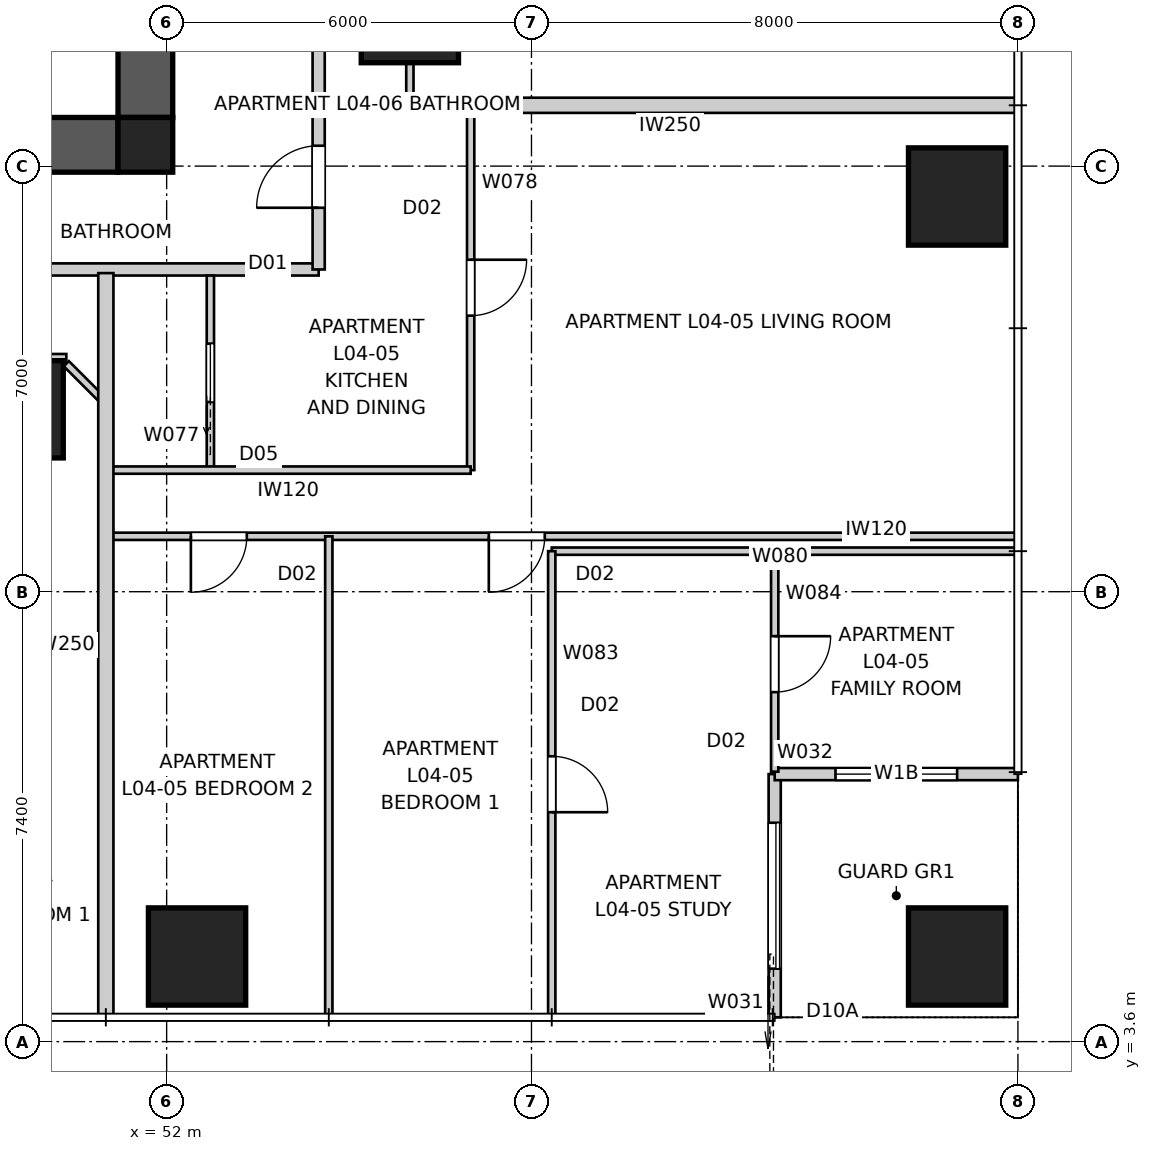
"""IFC4 building model, lengths in metres.
Left out: names, types, materials, properties, quantities, classifications, styles, units other than length and angle.
Written with IfcOpenShell. Run it as: python <this file> out.ifc"""

import sys

from ifc_helpers import new_model, si_unit, direction, frame, frame_2d, origin, origin_2d, place, context, subcontext, project, spatial, polyline, rectangle, outline, extrude, element, fill, save


model = new_model("IFC4")
c1 = context("Model", 3, precision=1e-05, world=origin(), true_north=direction((0.0, 1.0)))
c2 = subcontext(c1, "Body", "Model", "MODEL_VIEW")
j1 = project(units=[si_unit("LENGTHUNIT", "METRE"), si_unit("PLANEANGLEUNIT", "RADIAN")], contexts=[c1])
p1 = place(None, origin())
s1 = spatial("IfcSite", under=j1, at=p1, CompositionType="ELEMENT")
p2 = place(p1, origin())
s2 = spatial("IfcBuilding", under=s1, at=p2, CompositionType="ELEMENT")
p3 = place(p2, frame((0.0, 0.0, 18.4)))
s3 = spatial("IfcBuildingStorey", under=s2, at=p3, CompositionType="ELEMENT", Elevation=18.4)
p4 = place(p3, frame((51.2, 18.35, 0.0), z_axis=(0.0, 0.0, 1.0), x_axis=(-1.0, 0.0, 0.0)))
e1 = element("IfcWall", 1, at=p4, inside=s3, PredefinedType="SHEAR", context=c2, shape_type="SweptSolid", body=[
    extrude(outline(polyline([(0.0, -0.45), (22.4, -0.45), (22.4, -0.025), (22.85, -0.025), (22.85, 0.025), (22.4, 0.025), (22.4, 0.45), (0.0, 0.45), (0.0, 0.025), (-0.45, 0.025), (-0.45, -0.025), (0.0, -0.025), (0.0, -0.45)])), origin(), (0.0, 0.0, 1.0), 3.4),
])
p5 = place(p3, frame((51.65, 18.8, 0.0), z_axis=(0.0, 0.0, 1.0), x_axis=(0.0, 1.0, 0.0)))
e2 = element("IfcWall", 2, at=p5, inside=s3, PredefinedType="SHEAR", context=c2, shape_type="SweptSolid", body=[
    extrude(outline(polyline([(0.0, -0.45), (22.4, -0.45), (22.4, -0.025), (22.85, -0.025), (22.85, 0.025), (22.4, 0.025), (22.4, 0.45), (0.0, 0.45), (0.0, 0.025), (-0.45, 0.025), (-0.45, -0.025), (0.0, -0.025), (0.0, -0.45)])), origin(), (0.0, 0.0, 1.0), 3.4),
])
p6 = place(p5, frame((11.14, 0.0, 0.0)))
e3 = element("IfcOpeningElement", 3, at=p6, cuts=e2, PredefinedType="OPENING", context=c2, shape_type="SweptSolid", body=[
    extrude(rectangle(XDim=1.02, YDim=2.4, at=frame_2d((0.51, 1.2))), frame((0.0, 0.46, 0.0), z_axis=(0.0, -1.0, 0.0), x_axis=(1.0, 0.0, 0.0)), (0.0, 0.0, 1.0), 0.92),
])
p7 = place(p3, frame((51.65, 18.35, 0.0), z_axis=(0.0, 0.0, 1.0), x_axis=(1.0, 0.0, 0.0)))
e4 = element("IfcColumn", 4, at=p7, inside=s3, PredefinedType="COLUMN", context=c2, shape_type="SweptSolid", body=[
    extrude(rectangle(XDim=0.9, YDim=0.9, at=origin_2d()), origin(), (0.0, 0.0, 1.0), 3.4),
])
for number, where, z_axis, x_axis in (
    (5, (52.5, 5.0, 0.0), (0.0, 0.0, 1.0), (1.0, 0.0, 0.0)),
    (6, (65.0, 5.0, 0.0), (0.0, 0.0, 1.0), (1.0, 0.0, 0.0)),
    (7, (65.0, 17.5, 0.0), (0.0, 0.0, 1.0), (1.0, 0.0, 0.0)),
    (8, (49.5, 14.0, 0.0), (0.0, 0.0, 1.0), (1.0, 0.0, 0.0)),
    (9, (56.0, 20.5, 0.0), (0.0, 0.0, 1.0), (1.0, 0.0, 0.0)),
):
    element("IfcColumn", number, at=place(p3, frame(where, z_axis=z_axis, x_axis=x_axis)), inside=s3, PredefinedType="COLUMN", context=c2, shape_type="SweptSolid", body=[
        extrude(rectangle(XDim=1.6, YDim=1.6, at=origin_2d()), origin(), (0.0, 0.0, 1.0), 3.4),
    ])
p8 = place(p3, frame((62.0, 4.0, 0.0), z_axis=(0.0, 0.0, 1.0), x_axis=(0.0, 1.0, 0.0)))
e10 = element("IfcWall", 10, at=p8, inside=s3, PredefinedType="SOLIDWALL", context=c2, shape_type="SweptSolid", body=[
    extrude(rectangle(XDim=4.0, YDim=0.2, at=frame_2d((2.0, 0.0))), origin(), (0.0, 0.0, 1.0), 3.25),
])
p9 = place(p8, frame((0.8, 0.0, 0.0)))
e11 = element("IfcOpeningElement", 11, at=p9, cuts=e10, PredefinedType="OPENING", context=c2, shape_type="SweptSolid", body=[
    extrude(rectangle(XDim=2.4, YDim=2.1, at=frame_2d((1.2, 1.05))), frame((0.0, 0.11, 0.0), z_axis=(0.0, -1.0, 0.0), x_axis=(1.0, 0.0, 0.0)), (0.0, 0.0, 1.0), 0.22),
])
p10 = place(p3, frame((62.0, 8.0, 0.0), z_axis=(0.0, 0.0, 1.0), x_axis=(1.0, 0.0, 0.0)))
e12 = element("IfcWall", 12, at=p10, inside=s3, PredefinedType="SOLIDWALL", context=c2, shape_type="SweptSolid", body=[
    extrude(rectangle(XDim=4.0, YDim=0.2, at=frame_2d((2.0, 0.0))), origin(), (0.0, 0.0, 1.0), 3.25),
])
p11 = place(p10, frame((1.0, 0.0, 0.45)))
e13 = element("IfcOpeningElement", 13, at=p11, cuts=e12, PredefinedType="OPENING", context=c2, shape_type="SweptSolid", body=[
    extrude(rectangle(XDim=2.0, YDim=1.8, at=frame_2d((1.0, 0.9))), frame((0.0, 0.11, 0.0), z_axis=(0.0, -1.0, 0.0), x_axis=(1.0, 0.0, 0.0)), (0.0, 0.0, 1.0), 0.22),
])
p12 = place(p3, frame((25.5, 16.3, 0.0), z_axis=(0.0, 0.0, 1.0), x_axis=(1.0, 0.0, 0.0)))
e14 = element("IfcWall", 14, at=p12, inside=s3, PredefinedType="PARTITIONING", context=c2, shape_type="SweptSolid", body=[
    extrude(rectangle(XDim=29.0, YDim=0.2, at=frame_2d((14.5, 0.0))), origin(), (0.0, 0.0, 1.0), 3.25),
])
p13 = place(p12, frame((18.734, 0.0, 0.0)))
e15 = element("IfcOpeningElement", 15, at=p13, cuts=e14, PredefinedType="OPENING", context=c2, shape_type="SweptSolid", body=[
    extrude(rectangle(XDim=1.02, YDim=2.34, at=frame_2d((0.51, 1.17))), frame((0.0, 0.11, 0.0), z_axis=(0.0, -1.0, 0.0), x_axis=(1.0, 0.0, 0.0)), (0.0, 0.0, 1.0), 0.22),
])
p14 = place(p12, frame((5.096, 0.0, 0.0)))
e16 = element("IfcOpeningElement", 16, at=p14, cuts=e14, PredefinedType="OPENING", context=c2, shape_type="SweptSolid", body=[
    extrude(rectangle(XDim=1.02, YDim=2.34, at=frame_2d((0.51, 1.17))), frame((0.0, 0.11, 0.0), z_axis=(0.0, -1.0, 0.0), x_axis=(1.0, 0.0, 0.0)), (0.0, 0.0, 1.0), 0.22),
])
p15 = place(p3, frame((54.5, 16.3, 0.0), z_axis=(0.0, 0.0, 1.0), x_axis=(0.0, 1.0, 0.0)))
e17 = element("IfcWall", 17, at=p15, inside=s3, PredefinedType="PARTITIONING", context=c2, shape_type="SweptSolid", body=[
    extrude(rectangle(XDim=27.4, YDim=0.2, at=frame_2d((13.7, 0.0))), origin(), (0.0, 0.0, 1.0), 3.25),
])
p16 = place(p15, frame((20.998, 0.0, 0.0)))
e18 = element("IfcOpeningElement", 18, at=p16, cuts=e17, PredefinedType="OPENING", context=c2, shape_type="SweptSolid", body=[
    extrude(rectangle(XDim=1.02, YDim=2.34, at=frame_2d((0.51, 1.17))), frame((0.0, 0.11, 0.0), z_axis=(0.0, -1.0, 0.0), x_axis=(1.0, 0.0, 0.0)), (0.0, 0.0, 1.0), 0.22),
])
p17 = place(p15, frame((11.119, 0.0, 0.0)))
e19 = element("IfcOpeningElement", 19, at=p17, cuts=e17, PredefinedType="OPENING", context=c2, shape_type="SweptSolid", body=[
    extrude(rectangle(XDim=1.02, YDim=2.34, at=frame_2d((0.51, 1.17))), frame((0.0, 0.11, 0.0), z_axis=(0.0, -1.0, 0.0), x_axis=(1.0, 0.0, 0.0)), (0.0, 0.0, 1.0), 0.22),
])
p18 = place(p15, frame((1.015, 0.0, 0.0)))
e20 = element("IfcOpeningElement", 20, at=p18, cuts=e17, PredefinedType="OPENING", context=c2, shape_type="SweptSolid", body=[
    extrude(rectangle(XDim=1.02, YDim=2.34, at=frame_2d((0.51, 1.17))), frame((0.0, 0.11, 0.0), z_axis=(0.0, -1.0, 0.0), x_axis=(1.0, 0.0, 0.0)), (0.0, 0.0, 1.0), 0.22),
])
p19 = place(p3, frame((51.0, 4.0, 0.0), z_axis=(0.0, 0.0, 1.0), x_axis=(0.0, 1.0, 0.0)))
e21 = element("IfcWall", 21, at=p19, inside=s3, PredefinedType="PARTITIONING", context=c2, shape_type="SweptSolid", body=[
    extrude(rectangle(XDim=12.24, YDim=0.25, at=frame_2d((6.12, 0.0))), origin(), (0.0, 0.0, 1.0), 3.25),
])
p20 = place(p3, frame((66.0, 19.0, 0.0), z_axis=(0.0, 0.0, 1.0), x_axis=(-1.0, 0.0, 0.0)))
e22 = element("IfcWall", 22, at=p20, inside=s3, PredefinedType="PARTITIONING", context=c2, shape_type="SweptSolid", body=[
    extrude(rectangle(XDim=11.44, YDim=0.25, at=frame_2d((5.72, 0.0))), origin(), (0.0, 0.0, 1.0), 3.25),
])
p21 = place(p3, frame((51.0, 14.1, 0.0), z_axis=(0.0, 0.0, 1.0), x_axis=(-0.707106781187, 0.707106781187, 0.0)))
e23 = element("IfcWall", 23, at=p21, inside=s3, PredefinedType="PARTITIONING", context=c2, shape_type="SweptSolid", body=[
    extrude(rectangle(XDim=0.919, YDim=0.12, at=frame_2d((0.459, 0.0))), origin(), (0.0, 0.0, 1.0), 3.25),
])
p22 = place(p3, frame((50.35, 14.85, 0.0), z_axis=(0.0, 0.0, 1.0), x_axis=(-1.0, 0.0, 0.0)))
e24 = element("IfcWall", 24, at=p22, inside=s3, PredefinedType="PARTITIONING", context=c2, shape_type="SweptSolid", body=[
    extrude(rectangle(XDim=1.7, YDim=0.12, at=frame_2d((0.85, 0.0))), origin(), (0.0, 0.0, 1.0), 3.25),
])
p23 = place(p3, frame((52.719, 13.0, 0.0), z_axis=(0.0, 0.0, 1.0), x_axis=(0.0, 1.0, 0.0)))
e25 = element("IfcWall", 25, at=p23, inside=s3, PredefinedType="PARTITIONING", context=c2, shape_type="SweptSolid", body=[
    extrude(rectangle(XDim=3.2, YDim=0.12, at=frame_2d((1.6, 0.0))), origin(), (0.0, 0.0, 1.0), 3.25),
])
p24 = place(p23, frame((1.12, 0.0, 0.0)))
e26 = element("IfcOpeningElement", 26, at=p24, cuts=e25, PredefinedType="OPENING", context=c2, shape_type="SweptSolid", body=[
    extrude(rectangle(XDim=0.96, YDim=2.1, at=frame_2d((0.48, 1.05))), frame((0.0, 0.07, 0.0), z_axis=(0.0, -1.0, 0.0), x_axis=(1.0, 0.0, 0.0)), (0.0, 0.0, 1.0), 0.14),
])
p25 = place(p3, frame((57.0, 19.0, 0.0), z_axis=(0.0, 0.0, 1.0), x_axis=(0.0, -1.0, 0.0)))
e27 = element("IfcWall", 27, at=p25, inside=s3, PredefinedType="PARTITIONING", context=c2, shape_type="SweptSolid", body=[
    extrude(rectangle(XDim=6.0, YDim=0.12, at=frame_2d((3.0, 0.0))), origin(), (0.0, 0.0, 1.0), 3.25),
])
p26 = place(p25, frame((2.54, 0.0, 0.0)))
e28 = element("IfcOpeningElement", 28, at=p26, cuts=e27, PredefinedType="OPENING", context=c2, shape_type="SweptSolid", body=[
    extrude(rectangle(XDim=0.92, YDim=2.34, at=frame_2d((0.46, 1.17))), frame((0.0, 0.07, 0.0), z_axis=(0.0, -1.0, 0.0), x_axis=(1.0, 0.0, 0.0)), (0.0, 0.0, 1.0), 0.14),
])
p27 = place(p3, frame((57.0, 13.0, 0.0), z_axis=(0.0, 0.0, 1.0), x_axis=(-1.0, 0.0, 0.0)))
e29 = element("IfcWall", 29, at=p27, inside=s3, PredefinedType="PARTITIONING", context=c2, shape_type="SweptSolid", body=[
    extrude(rectangle(XDim=6.0, YDim=0.12, at=frame_2d((3.0, 0.0))), origin(), (0.0, 0.0, 1.0), 3.25),
])
p28 = place(p3, frame((65.96, 11.911, 0.0), z_axis=(0.0, 0.0, 1.0), x_axis=(-1.0, 0.0, 0.0)))
e30 = element("IfcWall", 30, at=p28, inside=s3, PredefinedType="PARTITIONING", context=c2, shape_type="SweptSolid", body=[
    extrude(rectangle(XDim=14.96, YDim=0.12, at=frame_2d((7.48, 0.0))), origin(), (0.0, 0.0, 1.0), 3.25),
])
p29 = place(p28, frame((7.742, 0.0, 0.0)))
e31 = element("IfcOpeningElement", 31, at=p29, cuts=e30, PredefinedType="OPENING", context=c2, shape_type="SweptSolid", body=[
    extrude(rectangle(XDim=0.92, YDim=2.34, at=frame_2d((0.46, 1.17))), frame((0.0, 0.07, 0.0), z_axis=(0.0, -1.0, 0.0), x_axis=(1.0, 0.0, 0.0)), (0.0, 0.0, 1.0), 0.14),
])
p30 = place(p28, frame((12.642, 0.0, 0.0)))
e32 = element("IfcOpeningElement", 32, at=p30, cuts=e30, PredefinedType="OPENING", context=c2, shape_type="SweptSolid", body=[
    extrude(rectangle(XDim=0.92, YDim=2.34, at=frame_2d((0.46, 1.17))), frame((0.0, 0.07, 0.0), z_axis=(0.0, -1.0, 0.0), x_axis=(1.0, 0.0, 0.0)), (0.0, 0.0, 1.0), 0.14),
])
p31 = place(p3, frame((54.667, 4.04, 0.0), z_axis=(0.0, 0.0, 1.0), x_axis=(0.0, 1.0, 0.0)))
e33 = element("IfcWall", 33, at=p31, inside=s3, PredefinedType="PARTITIONING", context=c2, shape_type="SweptSolid", body=[
    extrude(rectangle(XDim=7.871, YDim=0.12, at=frame_2d((3.936, 0.0))), origin(), (0.0, 0.0, 1.0), 2.638),
])
p32 = place(p3, frame((65.96, 11.667, 0.0), z_axis=(0.0, 0.0, 1.0), x_axis=(-1.0, 0.0, 0.0)))
e34 = element("IfcWall", 34, at=p32, inside=s3, PredefinedType="PARTITIONING", context=c2, shape_type="SweptSolid", body=[
    extrude(rectangle(XDim=7.627, YDim=0.12, at=frame_2d((3.813, 0.0))), origin(), (0.0, 0.0, 1.0), 3.25),
])
p33 = place(p3, frame((58.333, 11.667, 0.0), z_axis=(0.0, 0.0, 1.0), x_axis=(0.0, -1.0, 0.0)))
e35 = element("IfcWall", 35, at=p33, inside=s3, PredefinedType="PARTITIONING", context=c2, shape_type="SweptSolid", body=[
    extrude(rectangle(XDim=7.627, YDim=0.12, at=frame_2d((3.813, 0.0))), origin(), (0.0, 0.0, 1.0), 3.25),
])
p34 = place(p33, frame((3.373, 0.0, 0.0)))
e36 = element("IfcOpeningElement", 36, at=p34, cuts=e35, PredefinedType="OPENING", context=c2, shape_type="SweptSolid", body=[
    extrude(rectangle(XDim=0.92, YDim=2.34, at=frame_2d((0.46, 1.17))), frame((0.0, 0.07, 0.0), z_axis=(0.0, -1.0, 0.0), x_axis=(1.0, 0.0, 0.0)), (0.0, 0.0, 1.0), 0.14),
])
p35 = place(p3, frame((62.0, 11.667, 0.0), z_axis=(0.0, 0.0, 1.0), x_axis=(0.0, -1.0, 0.0)))
e37 = element("IfcWall", 37, at=p35, inside=s3, PredefinedType="PARTITIONING", context=c2, shape_type="SweptSolid", body=[
    extrude(rectangle(XDim=3.627, YDim=0.12, at=frame_2d((1.813, 0.0))), origin(), (0.0, 0.0, 1.0), 3.25),
])
p36 = place(p35, frame((1.398, 0.0, 0.0)))
e38 = element("IfcOpeningElement", 38, at=p36, cuts=e37, PredefinedType="OPENING", context=c2, shape_type="SweptSolid", body=[
    extrude(rectangle(XDim=0.92, YDim=2.34, at=frame_2d((0.46, 1.17))), frame((0.0, 0.07, 0.0), z_axis=(0.0, -1.0, 0.0), x_axis=(1.0, 0.0, 0.0)), (0.0, 0.0, 1.0), 0.14),
])
p37 = place(p3, frame((56.0, 22.649, 0.0), z_axis=(0.0, 0.0, 1.0), x_axis=(0.0, -1.0, 0.0)))
e39 = element("IfcWall", 39, at=p37, inside=s3, PredefinedType="PARTITIONING", context=c2, shape_type="SweptSolid", body=[
    extrude(rectangle(XDim=3.649, YDim=0.12, at=frame_2d((1.824, 0.0))), origin(), (0.0, 0.0, 1.0), 2.55),
])
p38 = place(p9, origin())
e40 = element("IfcDoor", 40, at=p38, inside=s3, OperationType="SLIDING_TO_LEFT", PredefinedType="DOOR", context=c2, shape_type="SweptSolid", body=[
    extrude(rectangle(XDim=2.4, YDim=2.1, at=frame_2d((1.2, 1.05))), frame((0.0, 0.025, 0.0), z_axis=(0.0, -1.0, 0.0), x_axis=(1.0, 0.0, 0.0)), (0.0, 0.0, 1.0), 0.05),
])
fill(e11, e40)
p39 = place(p11, origin())
e41 = element("IfcWindow", 41, at=p39, inside=s3, PartitioningType="SINGLE_PANEL", PredefinedType="WINDOW", context=c2, shape_type="SweptSolid", body=[
    extrude(rectangle(XDim=2.0, YDim=1.8, at=frame_2d((1.0, 0.9))), frame((0.0, 0.03, 0.0), z_axis=(0.0, -1.0, 0.0), x_axis=(1.0, 0.0, 0.0)), (0.0, 0.0, 1.0), 0.06),
])
fill(e13, e41)
p40 = place(p18, origin())
e42 = element("IfcDoor", 42, at=p40, inside=s3, OperationType="SINGLE_SWING_LEFT", PredefinedType="DOOR", context=c2, shape_type="SweptSolid", body=[
    extrude(rectangle(XDim=1.02, YDim=2.34, at=frame_2d((0.51, 1.17))), frame((0.0, 0.025, 0.0), z_axis=(0.0, -1.0, 0.0), x_axis=(1.0, 0.0, 0.0)), (0.0, 0.0, 1.0), 0.05),
])
fill(e20, e42)
p41 = place(p26, origin())
e43 = element("IfcDoor", 43, at=p41, inside=s3, OperationType="SINGLE_SWING_LEFT", PredefinedType="DOOR", context=c2, shape_type="SweptSolid", body=[
    extrude(rectangle(XDim=0.92, YDim=2.34, at=frame_2d((0.46, 1.17))), frame((0.0, 0.025, 0.0), z_axis=(0.0, -1.0, 0.0), x_axis=(1.0, 0.0, 0.0)), (0.0, 0.0, 1.0), 0.05),
])
fill(e28, e43)
p42 = place(p24, origin())
e44 = element("IfcDoor", 44, at=p42, inside=s3, OperationType="SLIDING_TO_LEFT", PredefinedType="DOOR", context=c2, shape_type="SweptSolid", body=[
    extrude(rectangle(XDim=0.96, YDim=2.1, at=frame_2d((0.48, 1.05))), frame((0.0, 0.025, 0.0), z_axis=(0.0, -1.0, 0.0), x_axis=(1.0, 0.0, 0.0)), (0.0, 0.0, 1.0), 0.05),
])
fill(e26, e44)
p43 = place(p29, origin())
e45 = element("IfcDoor", 45, at=p43, inside=s3, OperationType="SINGLE_SWING_RIGHT", PredefinedType="DOOR", context=c2, shape_type="SweptSolid", body=[
    extrude(rectangle(XDim=0.92, YDim=2.34, at=frame_2d((0.46, 1.17))), frame((0.0, 0.025, 0.0), z_axis=(0.0, -1.0, 0.0), x_axis=(1.0, 0.0, 0.0)), (0.0, 0.0, 1.0), 0.05),
])
fill(e31, e45)
p44 = place(p30, origin())
e46 = element("IfcDoor", 46, at=p44, inside=s3, OperationType="SINGLE_SWING_RIGHT", PredefinedType="DOOR", context=c2, shape_type="SweptSolid", body=[
    extrude(rectangle(XDim=0.92, YDim=2.34, at=frame_2d((0.46, 1.17))), frame((0.0, 0.025, 0.0), z_axis=(0.0, -1.0, 0.0), x_axis=(1.0, 0.0, 0.0)), (0.0, 0.0, 1.0), 0.05),
])
fill(e32, e46)
p45 = place(p34, origin())
e47 = element("IfcDoor", 47, at=p45, inside=s3, OperationType="SINGLE_SWING_RIGHT", PredefinedType="DOOR", context=c2, shape_type="SweptSolid", body=[
    extrude(rectangle(XDim=0.92, YDim=2.34, at=frame_2d((0.46, 1.17))), frame((0.0, 0.025, 0.0), z_axis=(0.0, -1.0, 0.0), x_axis=(1.0, 0.0, 0.0)), (0.0, 0.0, 1.0), 0.05),
])
fill(e36, e47)
p46 = place(p36, origin())
e48 = element("IfcDoor", 48, at=p46, inside=s3, OperationType="SINGLE_SWING_LEFT", PredefinedType="DOOR", context=c2, shape_type="SweptSolid", body=[
    extrude(rectangle(XDim=0.92, YDim=2.34, at=frame_2d((0.46, 1.17))), frame((0.0, 0.025, 0.0), z_axis=(0.0, -1.0, 0.0), x_axis=(1.0, 0.0, 0.0)), (0.0, 0.0, 1.0), 0.05),
])
fill(e38, e48)
save(model, sys.argv[1])
